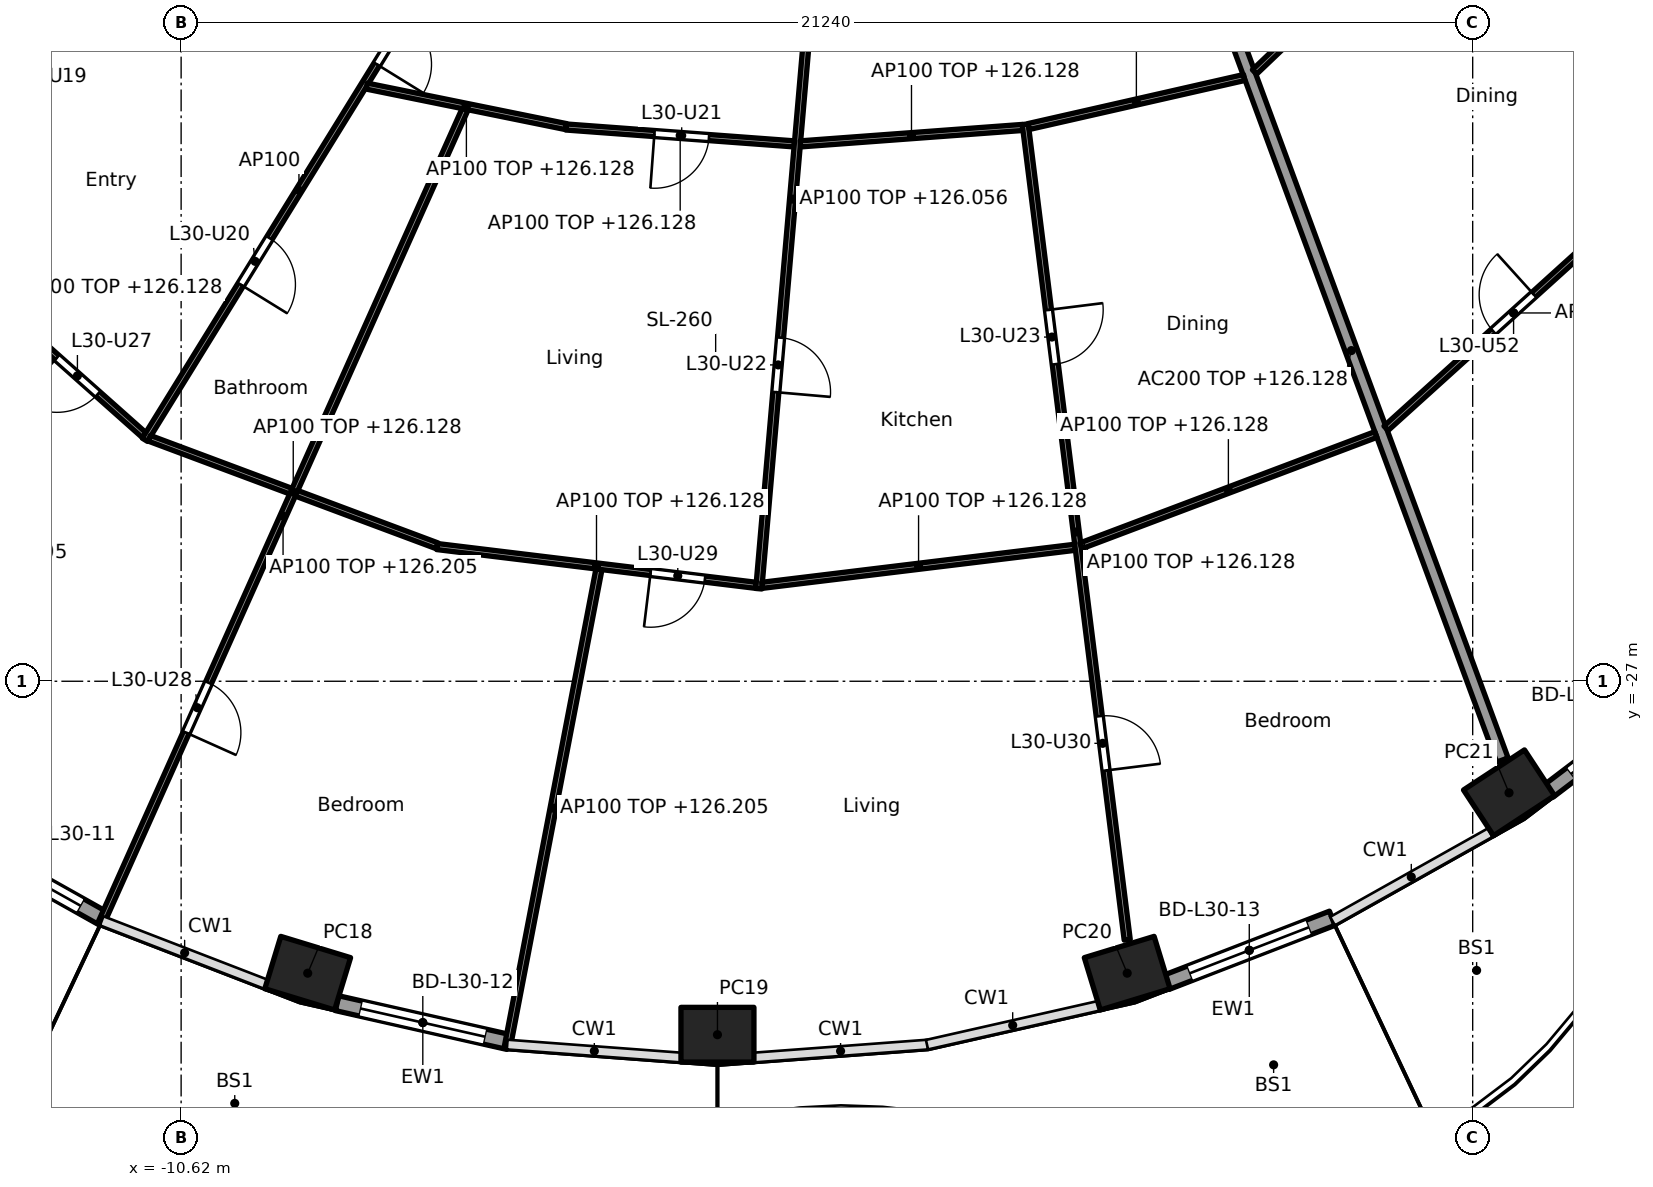
"""IFC4 building model, lengths in metres.
Left out: names, types, materials, properties, quantities, classifications, styles, units other than length and angle.
Written with IfcOpenShell. Run it as: python <this file> out.ifc"""

import sys

from ifc_helpers import new_model, si_unit, direction, frame, frame_2d, origin, origin_2d, place, context, subcontext, project, spatial, rectangle, hollow_rectangle, extrude, element, fill, save


model = new_model("IFC4")
c1 = context("Model", 3, precision=1e-05, world=origin(), true_north=direction((0.0, 1.0)))
c2 = subcontext(c1, "Body", "Model", "MODEL_VIEW")
j1 = project(units=[si_unit("LENGTHUNIT", "METRE"), si_unit("PLANEANGLEUNIT", "RADIAN")], contexts=[c1])
p1 = place(None, origin())
s1 = spatial("IfcSite", under=j1, at=p1, CompositionType="ELEMENT")
p2 = place(p1, origin())
s2 = spatial("IfcBuilding", under=s1, at=p2, CompositionType="ELEMENT")
p3 = place(p2, frame((0.0, 0.0, 123.3)))
s3 = spatial("IfcBuildingStorey", under=s2, at=p3, CompositionType="ELEMENT", Elevation=123.3)
for number, where, z_axis, x_axis in (
    (1, (-8.538, -31.801, 0.0), (0.0, 0.0, 1.0), (0.957, -0.292, 0.0)),
    (2, (-1.8, -32.813, 0.0), (0.0, 0.0, 1.0), (1.0, 0.0, 0.0)),
    (3, (4.938, -31.801, 0.0), (0.0, 0.0, 1.0), (0.957, 0.292, 0.0)),
    (4, (11.218, -28.834, 0.0), (0.0, 0.0, 1.0), (0.836, 0.549, 0.0)),
):
    element("IfcColumn", number, at=place(p3, frame(where, z_axis=z_axis, x_axis=x_axis)), inside=s3, PredefinedType="COLUMN", context=c2, shape_type="SweptSolid", body=[
        extrude(hollow_rectangle(XDim=1.2, YDim=0.9, WallThickness=0.04, at=origin_2d()), origin(), (0.0, 0.0, 1.0), 3.7),
    ])
p4 = place(p3, frame((-11.893, -30.905, 0.0), z_axis=(0.0, 0.0, 1.0), x_axis=(-0.87206688547, 0.489386705241, 0.0)))
e5 = element("IfcWall", 5, at=p4, inside=s3, PredefinedType="SOLIDWALL", context=c2, shape_type="SweptSolid", body=[
    extrude(rectangle(XDim=2.97, YDim=0.25, at=frame_2d((1.485, 0.0))), origin(), (0.0, 0.0, 1.0), 3.44),
])
p5 = place(p4, frame((0.435, 0.0, 0.0)))
e6 = element("IfcOpeningElement", 6, at=p5, cuts=e5, PredefinedType="OPENING", context=c2, shape_type="SweptSolid", body=[
    extrude(rectangle(XDim=2.1, YDim=2.4, at=frame_2d((1.05, 1.2))), frame((0.0, 0.135, 0.0), z_axis=(0.0, -1.0, 0.0), x_axis=(1.0, 0.0, 0.0)), (0.0, 0.0, 1.0), 0.27),
])
p6 = place(p3, frame((-5.236, -32.932, 0.0), z_axis=(0.0, 0.0, 1.0), x_axis=(-0.975339035722, 0.220711951186, 0.0)))
e7 = element("IfcWall", 7, at=p6, inside=s3, PredefinedType="SOLIDWALL", context=c2, shape_type="SweptSolid", body=[
    extrude(rectangle(XDim=2.89, YDim=0.25, at=frame_2d((1.445, 0.0))), origin(), (0.0, 0.0, 1.0), 3.44),
])
p7 = place(p6, frame((0.395, 0.0, 0.0)))
e8 = element("IfcOpeningElement", 8, at=p7, cuts=e7, PredefinedType="OPENING", context=c2, shape_type="SweptSolid", body=[
    extrude(rectangle(XDim=2.1, YDim=2.4, at=frame_2d((1.05, 1.2))), frame((0.0, 0.135, 0.0), z_axis=(0.0, -1.0, 0.0), x_axis=(1.0, 0.0, 0.0)), (0.0, 0.0, 1.0), 0.27),
])
p8 = place(p3, frame((8.31, -30.898, 0.0), z_axis=(0.0, 0.0, 1.0), x_axis=(-0.932845344347, -0.360277064952, 0.0)))
e9 = element("IfcWall", 9, at=p8, inside=s3, PredefinedType="SOLIDWALL", context=c2, shape_type="SweptSolid", body=[
    extrude(rectangle(XDim=2.923, YDim=0.25, at=frame_2d((1.462, 0.0))), origin(), (0.0, 0.0, 1.0), 3.44),
])
p9 = place(p8, frame((0.412, 0.0, 0.0)))
e10 = element("IfcOpeningElement", 10, at=p9, cuts=e9, PredefinedType="OPENING", context=c2, shape_type="SweptSolid", body=[
    extrude(rectangle(XDim=2.1, YDim=2.4, at=frame_2d((1.05, 1.2))), frame((0.0, 0.135, 0.0), z_axis=(0.0, -1.0, 0.0), x_axis=(1.0, 0.0, 0.0)), (0.0, 0.0, 1.0), 0.27),
])
p10 = place(p3, frame((14.278, -26.973, 0.0), z_axis=(0.0, 0.0, 1.0), x_axis=(-0.796022231079, -0.605267385233, 0.0)))
e11 = element("IfcWall", 11, at=p10, inside=s3, PredefinedType="SOLIDWALL", context=c2, shape_type="SweptSolid", body=[
    extrude(rectangle(XDim=3.026, YDim=0.25, at=frame_2d((1.513, 0.0))), origin(), (0.0, 0.0, 1.0), 3.44),
])
p11 = place(p10, frame((0.463, 0.0, 0.0)))
e12 = element("IfcOpeningElement", 12, at=p11, cuts=e11, PredefinedType="OPENING", context=c2, shape_type="SweptSolid", body=[
    extrude(rectangle(XDim=2.1, YDim=2.4, at=frame_2d((1.05, 1.2))), frame((0.0, 0.135, 0.0), z_axis=(0.0, -1.0, 0.0), x_axis=(1.0, 0.0, 0.0)), (0.0, 0.0, 1.0), 0.27),
])
p12 = place(p3, frame((6.14, -14.829, 0.0), z_axis=(0.0, 0.0, 1.0), x_axis=(0.346169582481, -0.938171956608, 0.0)))
e13 = element("IfcWall", 13, at=p12, inside=s3, PredefinedType="PARTITIONING", context=c2, shape_type="SweptSolid", body=[
    extrude(rectangle(XDim=14.354, YDim=0.2, at=frame_2d((7.177, 0.0))), origin(), (0.0, 0.0, 1.0), 2.828),
])
p13 = place(p3, frame((-7.725, -10.186, 0.0), z_axis=(0.0, 0.0, 1.0), x_axis=(-0.668498346565, -0.743713628112, 0.0)))
e14 = element("IfcWall", 14, at=p13, inside=s3, PredefinedType="PARTITIONING", context=c2, shape_type="SweptSolid", body=[
    extrude(rectangle(XDim=11.919, YDim=0.1, at=frame_2d((5.959, 0.0))), origin(), (0.0, 0.0, 1.0), 2.756),
])
p14 = place(p13, frame((2.106, 0.0, 0.0)))
e15 = element("IfcOpeningElement", 15, at=p14, cuts=e14, PredefinedType="OPENING", context=c2, shape_type="SweptSolid", body=[
    extrude(rectangle(XDim=0.9, YDim=2.1, at=frame_2d((0.45, 1.05))), frame((0.0, 0.06, 0.0), z_axis=(0.0, -1.0, 0.0), x_axis=(1.0, 0.0, 0.0)), (0.0, 0.0, 1.0), 0.12),
])
p15 = place(p13, frame((8.041, 0.0, 0.0)))
e16 = element("IfcOpeningElement", 16, at=p15, cuts=e14, PredefinedType="OPENING", context=c2, shape_type="SweptSolid", body=[
    extrude(rectangle(XDim=0.9, YDim=2.1, at=frame_2d((0.45, 1.05))), frame((0.0, 0.06, 0.0), z_axis=(0.0, -1.0, 0.0), x_axis=(1.0, 0.0, 0.0)), (0.0, 0.0, 1.0), 0.12),
])
p16 = place(p3, frame((-15.622, -19.046, 0.0), z_axis=(0.0, 0.0, 1.0), x_axis=(0.747342891849, -0.664438561496, 0.0)))
e17 = element("IfcWall", 17, at=p16, inside=s3, PredefinedType="PARTITIONING", context=c2, shape_type="SweptSolid", body=[
    extrude(rectangle(XDim=5.881, YDim=0.1, at=frame_2d((2.94, 0.0))), origin(), (0.0, 0.0, 1.0), 2.828),
])
p17 = place(p16, frame((3.961, 0.0, 0.0)))
e18 = element("IfcOpeningElement", 18, at=p17, cuts=e17, PredefinedType="OPENING", context=c2, shape_type="SweptSolid", body=[
    extrude(rectangle(XDim=0.9, YDim=2.1, at=frame_2d((0.45, 1.05))), frame((0.0, 0.06, 0.0), z_axis=(0.0, -1.0, 0.0), x_axis=(1.0, 0.0, 0.0)), (0.0, 0.0, 1.0), 0.12),
])
p18 = place(p3, frame((-6.149, -14.825, 0.0), z_axis=(0.0, 0.0, 1.0), x_axis=(-0.525396393596, -0.850857584791, 0.0)))
e19 = element("IfcWall", 19, at=p18, inside=s3, PredefinedType="PARTITIONING", context=c2, shape_type="SweptSolid", body=[
    extrude(rectangle(XDim=9.643, YDim=0.1, at=frame_2d((4.822, 0.0))), origin(), (0.0, 0.0, 1.0), 3.44),
])
p19 = place(p18, frame((1.485, 0.0, 0.0)))
e20 = element("IfcOpeningElement", 20, at=p19, cuts=e19, PredefinedType="OPENING", context=c2, shape_type="SweptSolid", body=[
    extrude(rectangle(XDim=0.9, YDim=2.1, at=frame_2d((0.45, 1.05))), frame((0.0, 0.06, 0.0), z_axis=(0.0, -1.0, 0.0), x_axis=(1.0, 0.0, 0.0)), (0.0, 0.0, 1.0), 0.12),
])
p20 = place(p18, frame((5.744, 0.0, 0.0)))
e21 = element("IfcOpeningElement", 21, at=p20, cuts=e19, PredefinedType="OPENING", context=c2, shape_type="SweptSolid", body=[
    extrude(rectangle(XDim=0.9, YDim=2.1, at=frame_2d((0.45, 1.05))), frame((0.0, 0.06, 0.0), z_axis=(0.0, -1.0, 0.0), x_axis=(1.0, 0.0, 0.0)), (0.0, 0.0, 1.0), 0.12),
])
p21 = place(p3, frame((-7.568, -17.212, 0.0), z_axis=(0.0, 0.0, 1.0), x_axis=(0.979967079473, -0.199159541946, 0.0)))
e22 = element("IfcWall", 22, at=p21, inside=s3, PredefinedType="PARTITIONING", context=c2, shape_type="SweptSolid", body=[
    extrude(rectangle(XDim=3.347, YDim=0.1, at=frame_2d((1.673, 0.0))), origin(), (0.0, 0.0, 1.0), 2.828),
])
p22 = place(p3, frame((-11.143, -23.004, 0.0), z_axis=(0.0, 0.0, 1.0), x_axis=(0.936721765635, -0.350074754567, 0.0)))
e23 = element("IfcWall", 23, at=p22, inside=s3, PredefinedType="PARTITIONING", context=c2, shape_type="SweptSolid", body=[
    extrude(rectangle(XDim=5.053, YDim=0.1, at=frame_2d((2.526, 0.0))), origin(), (0.0, 0.0, 1.0), 2.828),
])
p23 = place(p3, frame((-5.949, -17.591, 0.0), z_axis=(0.0, 0.0, 1.0), x_axis=(-0.40838467696, -0.912809923053, 0.0)))
e24 = element("IfcWall", 24, at=p23, inside=s3, PredefinedType="PARTITIONING", context=c2, shape_type="SweptSolid", body=[
    extrude(rectangle(XDim=14.665, YDim=0.1, at=frame_2d((7.333, 0.0))), origin(), (0.0, 0.0, 1.0), 2.905),
])
p24 = place(p23, frame((10.334, 0.0, 0.0)))
e25 = element("IfcOpeningElement", 25, at=p24, cuts=e24, PredefinedType="OPENING", context=c2, shape_type="SweptSolid", body=[
    extrude(rectangle(XDim=0.9, YDim=2.1, at=frame_2d((0.45, 1.05))), frame((0.0, 0.06, 0.0), z_axis=(0.0, -1.0, 0.0), x_axis=(1.0, 0.0, 0.0)), (0.0, 0.0, 1.0), 0.12),
])
p25 = place(p3, frame((-4.29, -17.885, 0.0), z_axis=(0.0, 0.0, 1.0), x_axis=(0.997272353708, -0.073809569363, 0.0)))
e26 = element("IfcWall", 26, at=p25, inside=s3, PredefinedType="PARTITIONING", context=c2, shape_type="SweptSolid", body=[
    extrude(rectangle(XDim=3.764, YDim=0.1, at=frame_2d((1.882, 0.0))), origin(), (0.0, 0.0, 1.0), 2.828),
])
p26 = place(p25, frame((1.457, 0.0, 0.0)))
e27 = element("IfcOpeningElement", 27, at=p26, cuts=e26, PredefinedType="OPENING", context=c2, shape_type="SweptSolid", body=[
    extrude(rectangle(XDim=0.9, YDim=2.1, at=frame_2d((0.45, 1.05))), frame((0.0, 0.06, 0.0), z_axis=(0.0, -1.0, 0.0), x_axis=(1.0, 0.0, 0.0)), (0.0, 0.0, 1.0), 0.12),
])
p27 = place(p3, frame((-6.413, -24.784, 0.0), z_axis=(0.0, 0.0, 1.0), x_axis=(0.992690077723, -0.120691381588, 0.0)))
e28 = element("IfcWall", 28, at=p27, inside=s3, PredefinedType="PARTITIONING", context=c2, shape_type="SweptSolid", body=[
    extrude(rectangle(XDim=5.286, YDim=0.1, at=frame_2d((2.643, 0.0))), origin(), (0.0, 0.0, 1.0), 2.828),
])
p28 = place(p27, frame((3.539, 0.0, 0.0)))
e29 = element("IfcOpeningElement", 29, at=p28, cuts=e28, PredefinedType="OPENING", context=c2, shape_type="SweptSolid", body=[
    extrude(rectangle(XDim=0.9, YDim=2.1, at=frame_2d((0.45, 1.05))), frame((0.0, 0.06, 0.0), z_axis=(0.0, -1.0, 0.0), x_axis=(1.0, 0.0, 0.0)), (0.0, 0.0, 1.0), 0.12),
])
p29 = place(p3, frame((-3.749, -25.159, 0.0), z_axis=(0.0, 0.0, 1.0), x_axis=(-0.188392334675, -0.982093848996, 0.0)))
e30 = element("IfcWall", 30, at=p29, inside=s3, PredefinedType="PARTITIONING", context=c2, shape_type="SweptSolid", body=[
    extrude(rectangle(XDim=8.0, YDim=0.1, at=frame_2d((4.0, 0.0))), origin(), (0.0, 0.0, 1.0), 2.905),
])
p30 = place(p3, frame((-0.009, -12.664, 0.0), z_axis=(0.0, 0.0, 1.0), x_axis=(-0.086441225464, -0.996256952066, 0.0)))
e31 = element("IfcWall", 31, at=p30, inside=s3, PredefinedType="PARTITIONING", context=c2, shape_type="SweptSolid", body=[
    extrude(rectangle(XDim=12.862, YDim=0.1, at=frame_2d((6.431, 0.0))), origin(), (0.0, 0.0, 1.0), 2.756),
])
p31 = place(p30, frame((2.312, 0.0, 0.0)))
e32 = element("IfcOpeningElement", 32, at=p31, cuts=e31, PredefinedType="OPENING", context=c2, shape_type="SweptSolid", body=[
    extrude(rectangle(XDim=0.9, YDim=2.1, at=frame_2d((0.45, 1.05))), frame((0.0, 0.06, 0.0), z_axis=(0.0, -1.0, 0.0), x_axis=(1.0, 0.0, 0.0)), (0.0, 0.0, 1.0), 0.12),
])
p32 = place(p30, frame((8.718, 0.0, 0.0)))
e33 = element("IfcOpeningElement", 33, at=p32, cuts=e31, PredefinedType="OPENING", context=c2, shape_type="SweptSolid", body=[
    extrude(rectangle(XDim=0.9, YDim=2.1, at=frame_2d((0.45, 1.05))), frame((0.0, 0.06, 0.0), z_axis=(0.0, -1.0, 0.0), x_axis=(1.0, 0.0, 0.0)), (0.0, 0.0, 1.0), 0.12),
])
p33 = place(p3, frame((-0.436, -18.163, 0.0), z_axis=(0.0, 0.0, 1.0), x_axis=(0.997271025958, 0.073827506966, 0.0)))
e34 = element("IfcWall", 34, at=p33, inside=s3, PredefinedType="PARTITIONING", context=c2, shape_type="SweptSolid", body=[
    extrude(rectangle(XDim=3.664, YDim=0.1, at=frame_2d((1.832, 0.0))), origin(), (0.0, 0.0, 1.0), 2.828),
])
p34 = place(p3, frame((-1.066, -25.422, 0.0), z_axis=(0.0, 0.0, 1.0), x_axis=(0.992692993044, 0.120667400577, 0.0)))
e35 = element("IfcWall", 35, at=p34, inside=s3, PredefinedType="PARTITIONING", context=c2, shape_type="SweptSolid", body=[
    extrude(rectangle(XDim=5.186, YDim=0.1, at=frame_2d((2.593, 0.0))), origin(), (0.0, 0.0, 1.0), 2.828),
])
p35 = place(p3, frame((3.262, -17.839, 0.0), z_axis=(0.0, 0.0, 1.0), x_axis=(0.124074750982, -0.992272873845, 0.0)))
e36 = element("IfcWall", 36, at=p35, inside=s3, PredefinedType="PARTITIONING", context=c2, shape_type="SweptSolid", body=[
    extrude(rectangle(XDim=13.516, YDim=0.1, at=frame_2d((6.758, 0.0))), origin(), (0.0, 0.0, 1.0), 2.828),
])
p36 = place(p35, frame((3.078, 0.0, 0.0)))
e37 = element("IfcOpeningElement", 37, at=p36, cuts=e36, PredefinedType="OPENING", context=c2, shape_type="SweptSolid", body=[
    extrude(rectangle(XDim=0.9, YDim=2.1, at=frame_2d((0.45, 1.05))), frame((0.0, 0.06, 0.0), z_axis=(0.0, -1.0, 0.0), x_axis=(1.0, 0.0, 0.0)), (0.0, 0.0, 1.0), 0.12),
])
p37 = place(p35, frame((9.811, 0.0, 0.0)))
e38 = element("IfcOpeningElement", 38, at=p37, cuts=e36, PredefinedType="OPENING", context=c2, shape_type="SweptSolid", body=[
    extrude(rectangle(XDim=0.9, YDim=2.1, at=frame_2d((0.45, 1.05))), frame((0.0, 0.06, 0.0), z_axis=(0.0, -1.0, 0.0), x_axis=(1.0, 0.0, 0.0)), (0.0, 0.0, 1.0), 0.12),
])
p38 = place(p3, frame((3.317, -17.878, 0.0), z_axis=(0.0, 0.0, 1.0), x_axis=(0.975095905288, 0.221783623135, 0.0)))
e39 = element("IfcWall", 39, at=p38, inside=s3, PredefinedType="PARTITIONING", context=c2, shape_type="SweptSolid", body=[
    extrude(rectangle(XDim=3.636, YDim=0.1, at=frame_2d((1.818, 0.0))), origin(), (0.0, 0.0, 1.0), 2.828),
])
p39 = place(p3, frame((4.178, -24.773, 0.0), z_axis=(0.0, 0.0, 1.0), x_axis=(0.935583811437, 0.353104703702, 0.0)))
e40 = element("IfcWall", 40, at=p39, inside=s3, PredefinedType="PARTITIONING", context=c2, shape_type="SweptSolid", body=[
    extrude(rectangle(XDim=5.184, YDim=0.1, at=frame_2d((2.592, 0.0))), origin(), (0.0, 0.0, 1.0), 2.828),
])
p40 = place(p3, frame((7.032, -16.98, 0.0), z_axis=(0.0, 0.0, 1.0), x_axis=(0.723709759148, 0.690104473622, 0.0)))
e41 = element("IfcWall", 41, at=p40, inside=s3, PredefinedType="PARTITIONING", context=c2, shape_type="SweptSolid", body=[
    extrude(rectangle(XDim=4.286, YDim=0.1, at=frame_2d((2.143, 0.0))), origin(), (0.0, 0.0, 1.0), 2.828),
])
p41 = place(p3, frame((9.195, -22.84, 0.0), z_axis=(0.0, 0.0, 1.0), x_axis=(0.741675855479, 0.670758470241, 0.0)))
e42 = element("IfcWall", 42, at=p41, inside=s3, PredefinedType="PARTITIONING", context=c2, shape_type="SweptSolid", body=[
    extrude(rectangle(XDim=5.656, YDim=0.1, at=frame_2d((2.828, 0.0))), origin(), (0.0, 0.0, 1.0), 2.828),
])
p42 = place(p41, frame((2.378, 0.0, 0.0)))
e43 = element("IfcOpeningElement", 43, at=p42, cuts=e42, PredefinedType="OPENING", context=c2, shape_type="SweptSolid", body=[
    extrude(rectangle(XDim=0.9, YDim=2.1, at=frame_2d((0.45, 1.05))), frame((0.0, 0.06, 0.0), z_axis=(0.0, -1.0, 0.0), x_axis=(1.0, 0.0, 0.0)), (0.0, 0.0, 1.0), 0.12),
])
p43 = place(p5, origin())
e44 = element("IfcDoor", 44, at=p43, inside=s3, OperationType="SLIDING_TO_LEFT", PredefinedType="DOOR", context=c2, shape_type="SweptSolid", body=[
    extrude(rectangle(XDim=2.1, YDim=2.4, at=frame_2d((1.05, 1.2))), frame((0.0, 0.025, 0.0), z_axis=(0.0, -1.0, 0.0), x_axis=(1.0, 0.0, 0.0)), (0.0, 0.0, 1.0), 0.05),
])
fill(e6, e44)
p44 = place(p7, origin())
e45 = element("IfcDoor", 45, at=p44, inside=s3, OperationType="SLIDING_TO_LEFT", PredefinedType="DOOR", context=c2, shape_type="SweptSolid", body=[
    extrude(rectangle(XDim=2.1, YDim=2.4, at=frame_2d((1.05, 1.2))), frame((0.0, 0.025, 0.0), z_axis=(0.0, -1.0, 0.0), x_axis=(1.0, 0.0, 0.0)), (0.0, 0.0, 1.0), 0.05),
])
fill(e8, e45)
p45 = place(p9, origin())
e46 = element("IfcDoor", 46, at=p45, inside=s3, OperationType="SLIDING_TO_LEFT", PredefinedType="DOOR", context=c2, shape_type="SweptSolid", body=[
    extrude(rectangle(XDim=2.1, YDim=2.4, at=frame_2d((1.05, 1.2))), frame((0.0, 0.025, 0.0), z_axis=(0.0, -1.0, 0.0), x_axis=(1.0, 0.0, 0.0)), (0.0, 0.0, 1.0), 0.05),
])
fill(e10, e46)
p46 = place(p11, origin())
e47 = element("IfcDoor", 47, at=p46, inside=s3, OperationType="SLIDING_TO_LEFT", PredefinedType="DOOR", context=c2, shape_type="SweptSolid", body=[
    extrude(rectangle(XDim=2.1, YDim=2.4, at=frame_2d((1.05, 1.2))), frame((0.0, 0.025, 0.0), z_axis=(0.0, -1.0, 0.0), x_axis=(1.0, 0.0, 0.0)), (0.0, 0.0, 1.0), 0.05),
])
fill(e12, e47)
p47 = place(p19, origin())
e48 = element("IfcDoor", 48, at=p47, inside=s3, OperationType="SINGLE_SWING_RIGHT", PredefinedType="DOOR", context=c2, shape_type="SweptSolid", body=[
    extrude(rectangle(XDim=0.9, YDim=2.1, at=frame_2d((0.45, 1.05))), frame((0.0, 0.025, 0.0), z_axis=(0.0, -1.0, 0.0), x_axis=(1.0, 0.0, 0.0)), (0.0, 0.0, 1.0), 0.05),
])
fill(e20, e48)
p48 = place(p20, origin())
e49 = element("IfcDoor", 49, at=p48, inside=s3, OperationType="SINGLE_SWING_RIGHT", PredefinedType="DOOR", context=c2, shape_type="SweptSolid", body=[
    extrude(rectangle(XDim=0.9, YDim=2.1, at=frame_2d((0.45, 1.05))), frame((0.0, 0.025, 0.0), z_axis=(0.0, -1.0, 0.0), x_axis=(1.0, 0.0, 0.0)), (0.0, 0.0, 1.0), 0.05),
])
fill(e21, e49)
p49 = place(p26, frame((0.9, 0.0, 0.0), x_axis=(-1.0, 0.0, 0.0)))
e50 = element("IfcDoor", 50, at=p49, inside=s3, OperationType="SINGLE_SWING_RIGHT", PredefinedType="DOOR", context=c2, shape_type="SweptSolid", body=[
    extrude(rectangle(XDim=0.9, YDim=2.1, at=frame_2d((0.45, 1.05))), frame((0.0, 0.025, 0.0), z_axis=(0.0, -1.0, 0.0), x_axis=(1.0, 0.0, 0.0)), (0.0, 0.0, 1.0), 0.05),
])
fill(e27, e50)
p50 = place(p32, origin())
e51 = element("IfcDoor", 51, at=p50, inside=s3, OperationType="SINGLE_SWING_RIGHT", PredefinedType="DOOR", context=c2, shape_type="SweptSolid", body=[
    extrude(rectangle(XDim=0.9, YDim=2.1, at=frame_2d((0.45, 1.05))), frame((0.0, 0.025, 0.0), z_axis=(0.0, -1.0, 0.0), x_axis=(1.0, 0.0, 0.0)), (0.0, 0.0, 1.0), 0.05),
])
fill(e33, e51)
p51 = place(p36, origin())
e52 = element("IfcDoor", 52, at=p51, inside=s3, OperationType="SINGLE_SWING_LEFT", PredefinedType="DOOR", context=c2, shape_type="SweptSolid", body=[
    extrude(rectangle(XDim=0.9, YDim=2.1, at=frame_2d((0.45, 1.05))), frame((0.0, 0.025, 0.0), z_axis=(0.0, -1.0, 0.0), x_axis=(1.0, 0.0, 0.0)), (0.0, 0.0, 1.0), 0.05),
])
fill(e37, e52)
p52 = place(p17, frame((0.9, 0.0, 0.0), x_axis=(-1.0, 0.0, 0.0)))
e53 = element("IfcDoor", 53, at=p52, inside=s3, OperationType="SINGLE_SWING_RIGHT", PredefinedType="DOOR", context=c2, shape_type="SweptSolid", body=[
    extrude(rectangle(XDim=0.9, YDim=2.1, at=frame_2d((0.45, 1.05))), frame((0.0, 0.025, 0.0), z_axis=(0.0, -1.0, 0.0), x_axis=(1.0, 0.0, 0.0)), (0.0, 0.0, 1.0), 0.05),
])
fill(e18, e53)
p53 = place(p24, origin())
e54 = element("IfcDoor", 54, at=p53, inside=s3, OperationType="SINGLE_SWING_RIGHT", PredefinedType="DOOR", context=c2, shape_type="SweptSolid", body=[
    extrude(rectangle(XDim=0.9, YDim=2.1, at=frame_2d((0.45, 1.05))), frame((0.0, 0.025, 0.0), z_axis=(0.0, -1.0, 0.0), x_axis=(1.0, 0.0, 0.0)), (0.0, 0.0, 1.0), 0.05),
])
fill(e25, e54)
p54 = place(p28, frame((0.9, 0.0, 0.0), x_axis=(-1.0, 0.0, 0.0)))
e55 = element("IfcDoor", 55, at=p54, inside=s3, OperationType="SINGLE_SWING_RIGHT", PredefinedType="DOOR", context=c2, shape_type="SweptSolid", body=[
    extrude(rectangle(XDim=0.9, YDim=2.1, at=frame_2d((0.45, 1.05))), frame((0.0, 0.025, 0.0), z_axis=(0.0, -1.0, 0.0), x_axis=(1.0, 0.0, 0.0)), (0.0, 0.0, 1.0), 0.05),
])
fill(e29, e55)
p55 = place(p37, origin())
e56 = element("IfcDoor", 56, at=p55, inside=s3, OperationType="SINGLE_SWING_RIGHT", PredefinedType="DOOR", context=c2, shape_type="SweptSolid", body=[
    extrude(rectangle(XDim=0.9, YDim=2.1, at=frame_2d((0.45, 1.05))), frame((0.0, 0.025, 0.0), z_axis=(0.0, -1.0, 0.0), x_axis=(1.0, 0.0, 0.0)), (0.0, 0.0, 1.0), 0.05),
])
fill(e38, e56)
p56 = place(p42, origin())
e57 = element("IfcDoor", 57, at=p56, inside=s3, OperationType="SINGLE_SWING_RIGHT", PredefinedType="DOOR", context=c2, shape_type="SweptSolid", body=[
    extrude(rectangle(XDim=0.9, YDim=2.1, at=frame_2d((0.45, 1.05))), frame((0.0, 0.025, 0.0), z_axis=(0.0, -1.0, 0.0), x_axis=(1.0, 0.0, 0.0)), (0.0, 0.0, 1.0), 0.05),
])
fill(e43, e57)
save(model, sys.argv[1])
